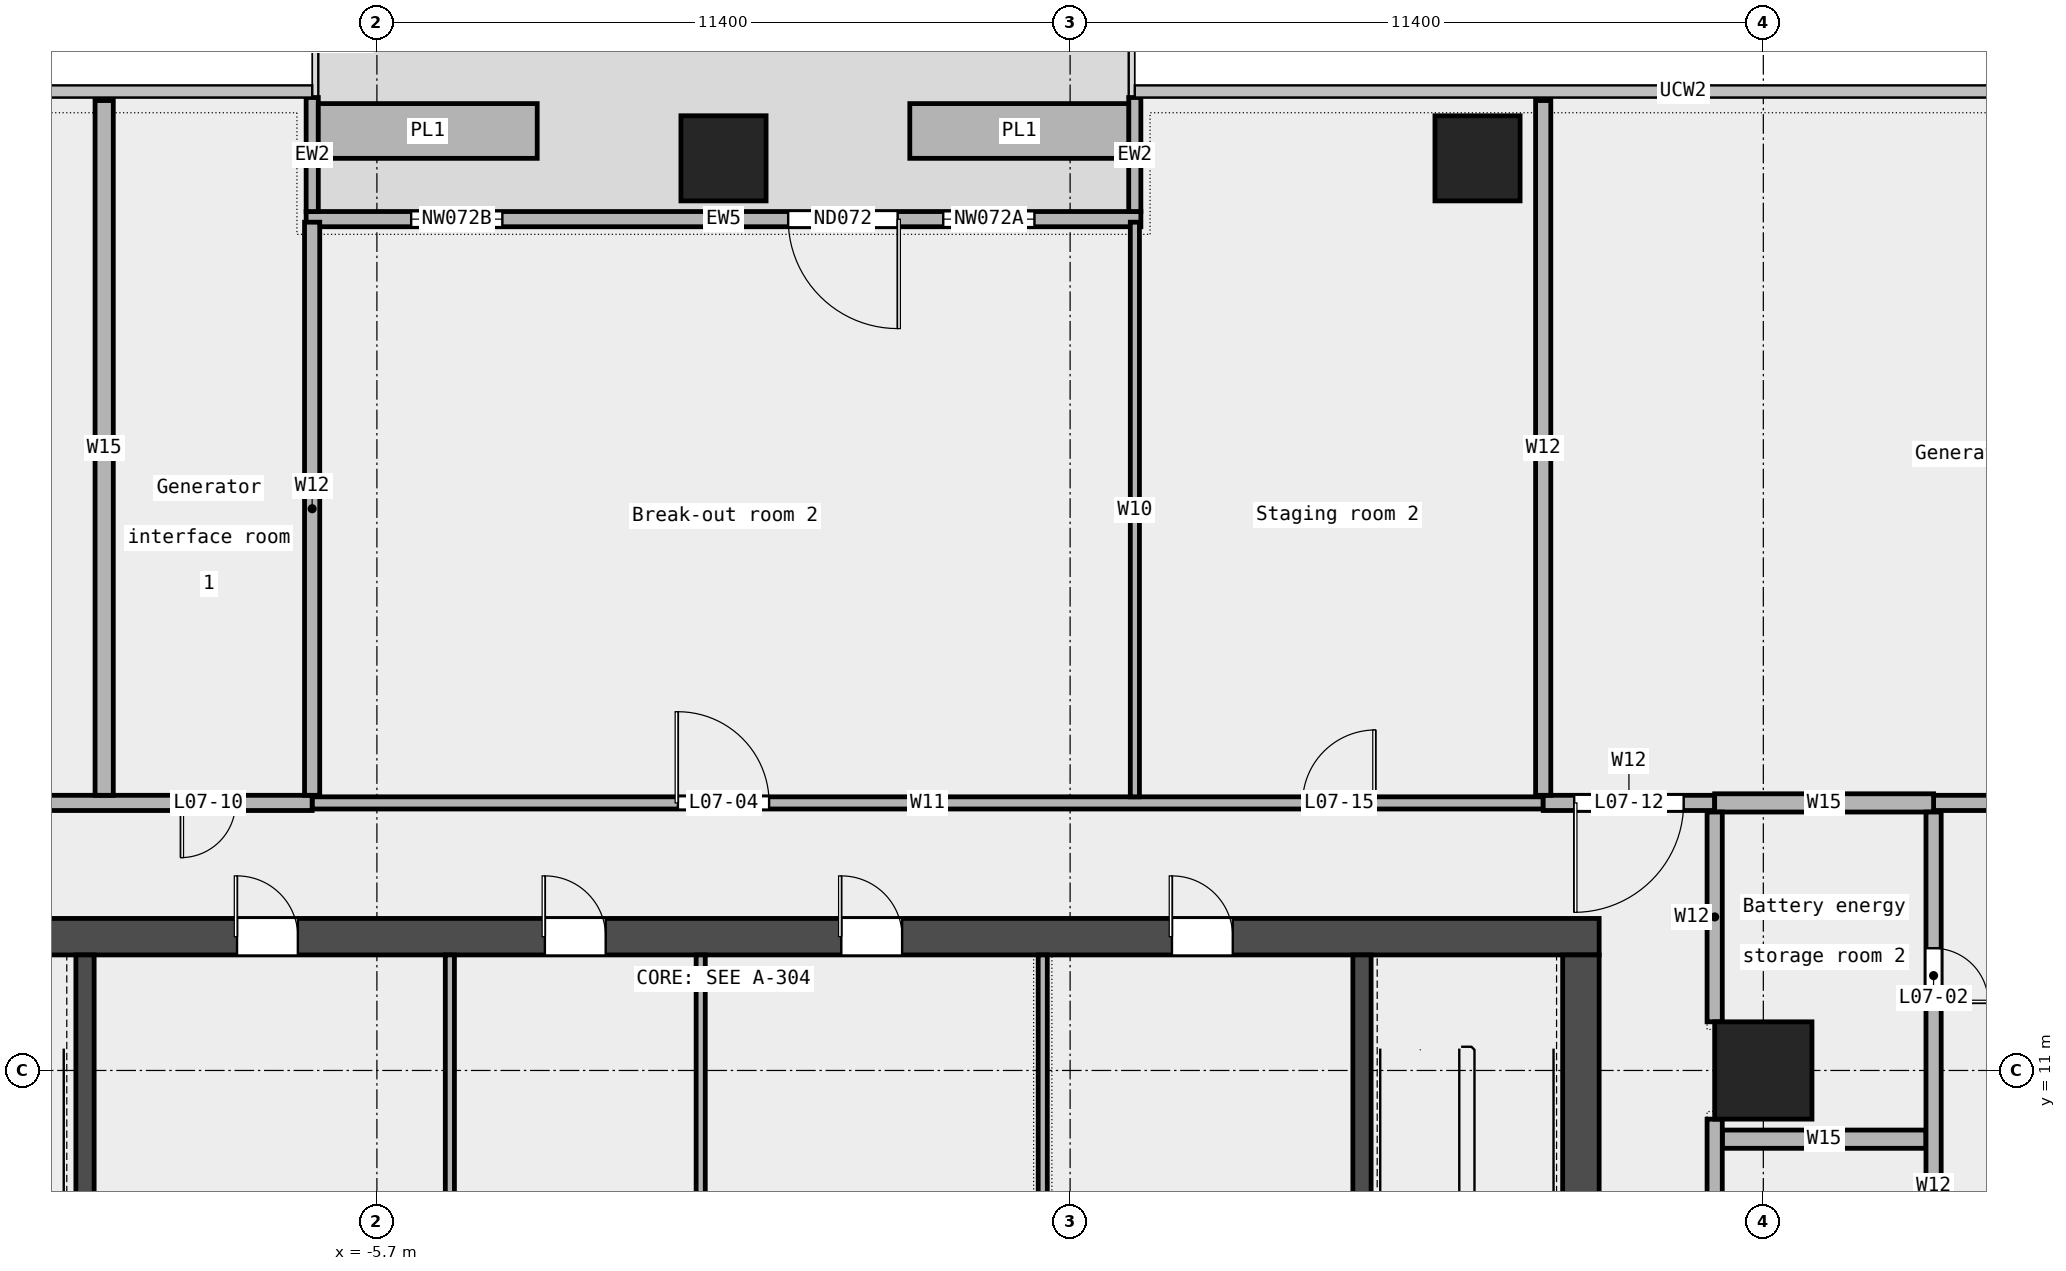
"""IFC4 building model, lengths in metres.
Left out: names, types, materials, properties, quantities, classifications, styles, units other than length and angle.
Written with IfcOpenShell. Run it as: python <this file> out.ifc"""

import sys

from ifc_helpers import new_model, si_unit, direction, frame, frame_2d, origin, origin_2d, place, context, subcontext, project, spatial, rectangle, extrude, element, fill, save


model = new_model("IFC4")
c1 = context("Model", 3, precision=1e-05, world=origin(), true_north=direction((0.0, 1.0)))
c2 = subcontext(c1, "Body", "Model", "MODEL_VIEW")
j1 = project(units=[si_unit("LENGTHUNIT", "METRE"), si_unit("PLANEANGLEUNIT", "RADIAN")], contexts=[c1])
p1 = place(None, origin())
s1 = spatial("IfcSite", under=j1, at=p1, CompositionType="ELEMENT")
p2 = place(p1, origin())
s2 = spatial("IfcBuilding", under=s1, at=p2, CompositionType="ELEMENT")
p3 = place(p2, frame((0.0, 0.0, 40.6)))
s3 = spatial("IfcBuildingStorey", under=s2, at=p3, CompositionType="ELEMENT", Elevation=40.6)
for number, where, z_axis, x_axis in (
    (1, (12.4, 26.0, 0.0), (0.0, 0.0, 1.0), (1.0, 0.0, 0.0)),
    (2, (0.0, 26.0, 0.0), (0.0, 0.0, 1.0), (1.0, 0.0, 0.0)),
):
    element("IfcColumn", number, at=place(p3, frame(where, z_axis=z_axis, x_axis=x_axis)), inside=s3, PredefinedType="COLUMN", context=c2, shape_type="SweptSolid", body=[
        extrude(rectangle(XDim=1.4, YDim=1.4, at=origin_2d()), origin(), (0.0, 0.0, 1.0), 4.35),
    ])
p4 = place(p3, frame((17.1, 11.0, 0.0), z_axis=(0.0, 0.0, 1.0), x_axis=(1.0, 0.0, 0.0)))
e3 = element("IfcColumn", 3, at=p4, inside=s3, PredefinedType="COLUMN", context=c2, shape_type="SweptSolid", body=[
    extrude(rectangle(XDim=1.6, YDim=1.6, at=origin_2d()), origin(), (0.0, 0.0, 1.0), 4.35),
])
p5 = place(p3, frame((6.864, 25.0, 0.0), z_axis=(0.0, 0.0, 1.0), x_axis=(-1.0, 0.0, 0.0)))
e4 = element("IfcWall", 4, at=p5, inside=s3, PredefinedType="STANDARD", context=c2, shape_type="SweptSolid", body=[
    extrude(rectangle(XDim=13.727, YDim=0.25, at=frame_2d((6.864, 0.0))), origin(), (0.0, 0.0, 1.0), 4.35),
])
p6 = place(p5, frame((1.75, 0.0, 0.45)))
e5 = element("IfcOpeningElement", 5, at=p6, cuts=e4, PredefinedType="OPENING", context=c2, shape_type="SweptSolid", body=[
    extrude(rectangle(XDim=1.5, YDim=3.0, at=frame_2d((0.75, 1.5))), frame((0.0, 0.137, 0.0), z_axis=(0.0, -1.0, 0.0), x_axis=(1.0, 0.0, 0.0)), (0.0, 0.0, 1.0), 0.274),
])
p7 = place(p5, frame((4.0, 0.0, 0.0)))
e6 = element("IfcOpeningElement", 6, at=p7, cuts=e4, PredefinedType="OPENING", context=c2, shape_type="SweptSolid", body=[
    extrude(rectangle(XDim=1.8, YDim=2.4, at=frame_2d((0.9, 1.2))), frame((0.0, 0.137, 0.0), z_axis=(0.0, -1.0, 0.0), x_axis=(1.0, 0.0, 0.0)), (0.0, 0.0, 1.0), 0.274),
])
p8 = place(p5, frame((10.5, 0.0, 0.45)))
e7 = element("IfcOpeningElement", 7, at=p8, cuts=e4, PredefinedType="OPENING", context=c2, shape_type="SweptSolid", body=[
    extrude(rectangle(XDim=1.5, YDim=3.0, at=frame_2d((0.75, 1.5))), frame((0.0, 0.137, 0.0), z_axis=(0.0, -1.0, 0.0), x_axis=(1.0, 0.0, 0.0)), (0.0, 0.0, 1.0), 0.274),
])
for number, where, z_axis, x_axis in (
    (8, (6.764, 27.0, 0.0), (0.0, 0.0, 1.0), (0.0, -1.0, 0.0)),
    (9, (-6.764, 27.0, 0.0), (0.0, 0.0, 1.0), (0.0, -1.0, 0.0)),
):
    element("IfcWall", number, at=place(p3, frame(where, z_axis=z_axis, x_axis=x_axis)), inside=s3, PredefinedType="STANDARD", context=c2, shape_type="SweptSolid", body=[
        extrude(rectangle(XDim=1.875, YDim=0.2, at=frame_2d((0.938, 0.0))), origin(), (0.0, 0.0, 1.0), 4.35),
    ])
for number, where, z_axis, x_axis in (
    (10, (6.664, 26.45, 0.0), (0.0, 0.0, 1.0), (-1.0, 0.0, 0.0)),
    (11, (-3.064, 26.45, 0.0), (0.0, 0.0, 1.0), (-1.0, 0.0, 0.0)),
):
    element("IfcWall", number, at=place(p3, frame(where, z_axis=z_axis, x_axis=x_axis)), inside=s3, PredefinedType="STANDARD", context=c2, shape_type="SweptSolid", body=[
        extrude(rectangle(XDim=3.6, YDim=0.9, at=frame_2d((1.8, 0.0))), origin(), (0.0, 0.0, 1.0), 0.7),
    ])
p9 = place(p3, frame((16.425, 9.87, 0.0), z_axis=(0.0, 0.0, 1.0), x_axis=(1.0, 0.0, 0.0)))
e12 = element("IfcWall", 12, at=p9, inside=s3, PredefinedType="PARTITIONING", context=c2, shape_type="SweptSolid", body=[
    extrude(rectangle(XDim=3.35, YDim=0.3, at=frame_2d((1.675, 0.0))), origin(), (0.0, 0.0, 1.0), 4.35),
])
p10 = place(p3, frame((-6.765, 15.4, 0.0), z_axis=(0.0, 0.0, 1.0), x_axis=(1.0, 0.0, 0.0)))
e13 = element("IfcWall", 13, at=p10, inside=s3, PredefinedType="PARTITIONING", context=c2, shape_type="SweptSolid", body=[
    extrude(rectangle(XDim=20.245, YDim=0.2, at=frame_2d((10.123, 0.0))), origin(), (0.0, 0.0, 1.0), 4.35),
])
p11 = place(p10, frame((6.015, 0.0, 0.0)))
e14 = element("IfcOpeningElement", 14, at=p11, cuts=e13, PredefinedType="OPENING", context=c2, shape_type="SweptSolid", body=[
    extrude(rectangle(XDim=1.5, YDim=2.1, at=frame_2d((0.75, 1.05))), frame((0.0, 0.112, 0.0), z_axis=(0.0, -1.0, 0.0), x_axis=(1.0, 0.0, 0.0)), (0.0, 0.0, 1.0), 0.224),
])
p12 = place(p10, frame((16.288, 0.0, 0.0)))
e15 = element("IfcOpeningElement", 15, at=p12, cuts=e13, PredefinedType="OPENING", context=c2, shape_type="SweptSolid", body=[
    extrude(rectangle(XDim=1.2, YDim=2.1, at=frame_2d((0.6, 1.05))), frame((0.0, 0.112, 0.0), z_axis=(0.0, -1.0, 0.0), x_axis=(1.0, 0.0, 0.0)), (0.0, 0.0, 1.0), 0.224),
])
p13 = place(p3, frame((-21.7, 15.4, 0.0), z_axis=(0.0, 0.0, 1.0), x_axis=(1.0, 0.0, 0.0)))
e16 = element("IfcWall", 16, at=p13, inside=s3, PredefinedType="PARTITIONING", context=c2, shape_type="SweptSolid", body=[
    extrude(rectangle(XDim=14.935, YDim=0.25, at=frame_2d((7.468, 0.0))), origin(), (0.0, 0.0, 1.0), 4.35),
])
p14 = place(p13, frame((12.775, 0.0, 0.0)))
e17 = element("IfcOpeningElement", 17, at=p14, cuts=e16, PredefinedType="OPENING", context=c2, shape_type="SweptSolid", body=[
    extrude(rectangle(XDim=0.9, YDim=2.1, at=frame_2d((0.45, 1.05))), frame((0.0, 0.137, 0.0), z_axis=(0.0, -1.0, 0.0), x_axis=(1.0, 0.0, 0.0)), (0.0, 0.0, 1.0), 0.274),
])
p15 = place(p13, frame((7.558, 0.0, 0.0)))
e18 = element("IfcOpeningElement", 18, at=p15, cuts=e16, PredefinedType="OPENING", context=c2, shape_type="SweptSolid", body=[
    extrude(rectangle(XDim=1.8, YDim=2.1, at=frame_2d((0.9, 1.05))), frame((0.0, 0.137, 0.0), z_axis=(0.0, -1.0, 0.0), x_axis=(1.0, 0.0, 0.0)), (0.0, 0.0, 1.0), 0.274),
])
p16 = place(p3, frame((13.48, 15.4, 0.0), z_axis=(0.0, 0.0, 1.0), x_axis=(1.0, 0.0, 0.0)))
e19 = element("IfcWall", 19, at=p16, inside=s3, PredefinedType="PARTITIONING", context=c2, shape_type="SweptSolid", body=[
    extrude(rectangle(XDim=2.82, YDim=0.25, at=frame_2d((1.41, 0.0))), origin(), (0.0, 0.0, 1.0), 4.35),
])
p17 = place(p16, frame((0.51, 0.0, 0.0)))
e20 = element("IfcOpeningElement", 20, at=p17, cuts=e19, PredefinedType="OPENING", context=c2, shape_type="SweptSolid", body=[
    extrude(rectangle(XDim=1.8, YDim=2.1, at=frame_2d((0.9, 1.05))), frame((0.0, 0.137, 0.0), z_axis=(0.0, -1.0, 0.0), x_axis=(1.0, 0.0, 0.0)), (0.0, 0.0, 1.0), 0.274),
])
p18 = place(p3, frame((19.9, 15.4, 0.0), z_axis=(0.0, 0.0, 1.0), x_axis=(1.0, 0.0, 0.0)))
e21 = element("IfcWall", 21, at=p18, inside=s3, PredefinedType="PARTITIONING", context=c2, shape_type="SweptSolid", body=[
    extrude(rectangle(XDim=10.85, YDim=0.25, at=frame_2d((5.425, 0.0))), origin(), (0.0, 0.0, 1.0), 4.35),
])
p19 = place(p3, frame((16.3, 15.4, 0.0), z_axis=(0.0, 0.0, 1.0), x_axis=(1.0, 0.0, 0.0)))
e22 = element("IfcWall", 22, at=p19, inside=s3, PredefinedType="PARTITIONING", context=c2, shape_type="SweptSolid", body=[
    extrude(rectangle(XDim=3.6, YDim=0.3, at=frame_2d((1.8, 0.0))), origin(), (0.0, 0.0, 1.0), 4.35),
])
p20 = place(p3, frame((-10.185, 15.525, 0.0), z_axis=(0.0, 0.0, 1.0), x_axis=(0.0, 1.0, 0.0)))
e23 = element("IfcWall", 23, at=p20, inside=s3, PredefinedType="PARTITIONING", context=c2, shape_type="SweptSolid", body=[
    extrude(rectangle(XDim=11.425, YDim=0.3, at=frame_2d((5.712, 0.0))), origin(), (0.0, 0.0, 1.0), 4.35),
])
p21 = place(p3, frame((-6.765, 15.525, 0.0), z_axis=(0.0, 0.0, 1.0), x_axis=(0.0, 1.0, 0.0)))
e24 = element("IfcWall", 24, at=p21, inside=s3, PredefinedType="PARTITIONING", context=c2, shape_type="SweptSolid", body=[
    extrude(rectangle(XDim=9.425, YDim=0.25, at=frame_2d((4.712, 0.0))), origin(), (0.0, 0.0, 1.0), 4.35),
])
p22 = place(p3, frame((6.765, 15.5, 0.0), z_axis=(0.0, 0.0, 1.0), x_axis=(0.0, 1.0, 0.0)))
e25 = element("IfcWall", 25, at=p22, inside=s3, PredefinedType="PARTITIONING", context=c2, shape_type="SweptSolid", body=[
    extrude(rectangle(XDim=9.45, YDim=0.15, at=frame_2d((4.725, 0.0))), origin(), (0.0, 0.0, 1.0), 4.35),
])
p23 = place(p3, frame((13.48, 15.525, 0.0), z_axis=(0.0, 0.0, 1.0), x_axis=(0.0, 1.0, 0.0)))
e26 = element("IfcWall", 26, at=p23, inside=s3, PredefinedType="PARTITIONING", context=c2, shape_type="SweptSolid", body=[
    extrude(rectangle(XDim=11.425, YDim=0.25, at=frame_2d((5.712, 0.0))), origin(), (0.0, 0.0, 1.0), 4.35),
])
p24 = place(p3, frame((16.3, 2.95, 0.0), z_axis=(0.0, 0.0, 1.0), x_axis=(0.0, 1.0, 0.0)))
e27 = element("IfcWall", 27, at=p24, inside=s3, PredefinedType="PARTITIONING", context=c2, shape_type="SweptSolid", body=[
    extrude(rectangle(XDim=7.25, YDim=0.25, at=frame_2d((3.625, 0.0))), origin(), (0.0, 0.0, 1.0), 4.35),
])
p25 = place(p3, frame((16.3, 11.8, 0.0), z_axis=(0.0, 0.0, 1.0), x_axis=(0.0, 1.0, 0.0)))
e28 = element("IfcWall", 28, at=p25, inside=s3, PredefinedType="PARTITIONING", context=c2, shape_type="SweptSolid", body=[
    extrude(rectangle(XDim=3.45, YDim=0.25, at=frame_2d((1.725, 0.0))), origin(), (0.0, 0.0, 1.0), 4.35),
])
p26 = place(p3, frame((19.9, 2.95, 0.0), z_axis=(0.0, 0.0, 1.0), x_axis=(0.0, 1.0, 0.0)))
e29 = element("IfcWall", 29, at=p26, inside=s3, PredefinedType="PARTITIONING", context=c2, shape_type="SweptSolid", body=[
    extrude(rectangle(XDim=12.3, YDim=0.25, at=frame_2d((6.15, 0.0))), origin(), (0.0, 0.0, 1.0), 4.35),
])
p27 = place(p26, frame((9.16, 0.0, 0.0)))
e30 = element("IfcOpeningElement", 30, at=p27, cuts=e29, PredefinedType="OPENING", context=c2, shape_type="SweptSolid", body=[
    extrude(rectangle(XDim=0.9, YDim=2.1, at=frame_2d((0.45, 1.05))), frame((0.0, 0.137, 0.0), z_axis=(0.0, -1.0, 0.0), x_axis=(1.0, 0.0, 0.0)), (0.0, 0.0, 1.0), 0.274),
])
p28 = place(p26, frame((3.01, 0.0, 0.0)))
e31 = element("IfcOpeningElement", 31, at=p28, cuts=e29, PredefinedType="OPENING", context=c2, shape_type="SweptSolid", body=[
    extrude(rectangle(XDim=0.9, YDim=2.1, at=frame_2d((0.45, 1.05))), frame((0.0, 0.137, 0.0), z_axis=(0.0, -1.0, 0.0), x_axis=(1.0, 0.0, 0.0)), (0.0, 0.0, 1.0), 0.274),
])
p29 = place(p3, frame((-14.4, 13.2, 0.0), z_axis=(0.0, 0.0, 1.0), x_axis=(1.0, 0.0, 0.0)))
e32 = element("IfcWall", 32, at=p29, inside=s3, PredefinedType="SHEAR", context=c2, shape_type="SweptSolid", body=[
    extrude(rectangle(XDim=28.8, YDim=0.6, at=frame_2d((14.4, 0.0))), origin(), (0.0, 0.0, 1.0), 4.5),
])
p30 = place(p29, frame((6.4, 0.0, 0.0)))
e33 = element("IfcOpeningElement", 33, at=p30, cuts=e32, PredefinedType="OPENING", context=c2, shape_type="SweptSolid", body=[
    extrude(rectangle(XDim=1.0, YDim=2.1, at=frame_2d((0.5, 1.05))), frame((0.0, 0.312, 0.0), z_axis=(0.0, -1.0, 0.0), x_axis=(1.0, 0.0, 0.0)), (0.0, 0.0, 1.0), 0.624),
])
p31 = place(p29, frame((11.462, 0.0, 0.0)))
e34 = element("IfcOpeningElement", 34, at=p31, cuts=e32, PredefinedType="OPENING", context=c2, shape_type="SweptSolid", body=[
    extrude(rectangle(XDim=1.0, YDim=2.1, at=frame_2d((0.5, 1.05))), frame((0.0, 0.312, 0.0), z_axis=(0.0, -1.0, 0.0), x_axis=(1.0, 0.0, 0.0)), (0.0, 0.0, 1.0), 0.624),
])
p32 = place(p29, frame((16.337, 0.0, 0.0)))
e35 = element("IfcOpeningElement", 35, at=p32, cuts=e32, PredefinedType="OPENING", context=c2, shape_type="SweptSolid", body=[
    extrude(rectangle(XDim=1.0, YDim=2.1, at=frame_2d((0.5, 1.05))), frame((0.0, 0.312, 0.0), z_axis=(0.0, -1.0, 0.0), x_axis=(1.0, 0.0, 0.0)), (0.0, 0.0, 1.0), 0.624),
])
p33 = place(p29, frame((21.775, 0.0, 0.0)))
e36 = element("IfcOpeningElement", 36, at=p33, cuts=e32, PredefinedType="OPENING", context=c2, shape_type="SweptSolid", body=[
    extrude(rectangle(XDim=1.0, YDim=2.1, at=frame_2d((0.5, 1.05))), frame((0.0, 0.312, 0.0), z_axis=(0.0, -1.0, 0.0), x_axis=(1.0, 0.0, 0.0)), (0.0, 0.0, 1.0), 0.624),
])
p34 = place(p3, frame((14.1, -6.6, 0.0), z_axis=(0.0, 0.0, 1.0), x_axis=(0.0, 1.0, 0.0)))
e37 = element("IfcWall", 37, at=p34, inside=s3, PredefinedType="SHEAR", context=c2, shape_type="SweptSolid", body=[
    extrude(rectangle(XDim=19.5, YDim=0.6, at=frame_2d((9.75, 0.0))), origin(), (0.0, 0.0, 1.0), 4.5),
])
p35 = place(p34, frame((9.3, 0.0, 0.0)))
e38 = element("IfcOpeningElement", 38, at=p35, cuts=e37, PredefinedType="OPENING", context=c2, shape_type="SweptSolid", body=[
    extrude(rectangle(XDim=1.8, YDim=2.1, at=frame_2d((0.9, 1.05))), frame((0.0, 0.312, 0.0), z_axis=(0.0, -1.0, 0.0), x_axis=(1.0, 0.0, 0.0)), (0.0, 0.0, 1.0), 0.624),
])
for number, where, z_axis, x_axis in (
    (39, (-10.5, 5.25, 0.0), (0.0, 0.0, 1.0), (0.0, 1.0, 0.0)),
    (40, (10.5, 5.25, 0.0), (0.0, 0.0, 1.0), (0.0, 1.0, 0.0)),
):
    element("IfcWall", number, at=place(p3, frame(where, z_axis=z_axis, x_axis=x_axis)), inside=s3, PredefinedType="SHEAR", context=c2, shape_type="SweptSolid", body=[
        extrude(rectangle(XDim=7.65, YDim=0.3, at=frame_2d((3.825, 0.0))), origin(), (0.0, 0.0, 1.0), 4.5),
    ])
for number, where, z_axis, x_axis in (
    (41, (-4.5, 8.55, 0.0), (0.0, 0.0, 1.0), (0.0, 1.0, 0.0)),
    (42, (-0.375, 8.55, 0.0), (0.0, 0.0, 1.0), (0.0, 1.0, 0.0)),
    (43, (5.25, 8.55, 0.0), (0.0, 0.0, 1.0), (0.0, 1.0, 0.0)),
):
    element("IfcWall", number, at=place(p3, frame(where, z_axis=z_axis, x_axis=x_axis)), inside=s3, PredefinedType="PARTITIONING", context=c2, shape_type="SweptSolid", body=[
        extrude(rectangle(XDim=4.35, YDim=0.15, at=frame_2d((2.175, 0.0))), origin(), (0.0, 0.0, 1.0), 4.5),
    ])
p36 = place(p6, origin())
e44 = element("IfcWindow", 44, at=p36, inside=s3, PartitioningType="SINGLE_PANEL", PredefinedType="WINDOW", context=c2, shape_type="SweptSolid", body=[
    extrude(rectangle(XDim=1.5, YDim=3.0, at=frame_2d((0.75, 1.5))), frame((0.0, 0.03, 0.0), z_axis=(0.0, -1.0, 0.0), x_axis=(1.0, 0.0, 0.0)), (0.0, 0.0, 1.0), 0.06),
])
fill(e5, e44)
p37 = place(p7, origin())
e45 = element("IfcDoor", 45, at=p37, inside=s3, OperationType="DOUBLE_DOOR_SINGLE_SWING", PredefinedType="DOOR", context=c2, shape_type="SweptSolid", body=[
    extrude(rectangle(XDim=1.8, YDim=2.4, at=frame_2d((0.9, 1.2))), frame((0.0, 0.025, 0.0), z_axis=(0.0, -1.0, 0.0), x_axis=(1.0, 0.0, 0.0)), (0.0, 0.0, 1.0), 0.05),
])
fill(e6, e45)
p38 = place(p8, origin())
e46 = element("IfcWindow", 46, at=p38, inside=s3, PartitioningType="SINGLE_PANEL", PredefinedType="WINDOW", context=c2, shape_type="SweptSolid", body=[
    extrude(rectangle(XDim=1.5, YDim=3.0, at=frame_2d((0.75, 1.5))), frame((0.0, 0.03, 0.0), z_axis=(0.0, -1.0, 0.0), x_axis=(1.0, 0.0, 0.0)), (0.0, 0.0, 1.0), 0.06),
])
fill(e7, e46)
p39 = place(p27, origin())
e47 = element("IfcDoor", 47, at=p39, inside=s3, OperationType="SINGLE_SWING_RIGHT", PredefinedType="DOOR", context=c2, shape_type="SweptSolid", body=[
    extrude(rectangle(XDim=0.9, YDim=2.1, at=frame_2d((0.45, 1.05))), frame((0.0, 0.025, 0.0), z_axis=(0.0, -1.0, 0.0), x_axis=(1.0, 0.0, 0.0)), (0.0, 0.0, 1.0), 0.05),
])
fill(e30, e47)
p40 = place(p11, origin())
e48 = element("IfcDoor", 48, at=p40, inside=s3, OperationType="DOUBLE_DOOR_SINGLE_SWING", PredefinedType="DOOR", context=c2, shape_type="SweptSolid", body=[
    extrude(rectangle(XDim=1.5, YDim=2.1, at=frame_2d((0.75, 1.05))), frame((0.0, 0.025, 0.0), z_axis=(0.0, -1.0, 0.0), x_axis=(1.0, 0.0, 0.0)), (0.0, 0.0, 1.0), 0.05),
])
fill(e14, e48)
p41 = place(p14, origin())
e49 = element("IfcDoor", 49, at=p41, inside=s3, OperationType="SINGLE_SWING_RIGHT", PredefinedType="DOOR", context=c2, shape_type="SweptSolid", body=[
    extrude(rectangle(XDim=0.9, YDim=2.1, at=frame_2d((0.45, 1.05))), frame((0.0, 0.025, 0.0), z_axis=(0.0, -1.0, 0.0), x_axis=(1.0, 0.0, 0.0)), (0.0, 0.0, 1.0), 0.05),
])
fill(e17, e49)
p42 = place(p17, origin())
e50 = element("IfcDoor", 50, at=p42, inside=s3, OperationType="DOUBLE_DOOR_SINGLE_SWING", PredefinedType="DOOR", context=c2, shape_type="SweptSolid", body=[
    extrude(rectangle(XDim=1.8, YDim=2.1, at=frame_2d((0.9, 1.05))), frame((0.0, 0.025, 0.0), z_axis=(0.0, -1.0, 0.0), x_axis=(1.0, 0.0, 0.0)), (0.0, 0.0, 1.0), 0.05),
])
fill(e20, e50)
p43 = place(p12, origin())
e51 = element("IfcDoor", 51, at=p43, inside=s3, OperationType="SINGLE_SWING_RIGHT", PredefinedType="DOOR", context=c2, shape_type="SweptSolid", body=[
    extrude(rectangle(XDim=1.2, YDim=2.1, at=frame_2d((0.6, 1.05))), frame((0.0, 0.025, 0.0), z_axis=(0.0, -1.0, 0.0), x_axis=(1.0, 0.0, 0.0)), (0.0, 0.0, 1.0), 0.05),
])
fill(e15, e51)
p44 = place(p30, origin())
e52 = element("IfcDoor", 52, at=p44, inside=s3, OperationType="SINGLE_SWING_LEFT", PredefinedType="DOOR", context=c2, shape_type="SweptSolid", body=[
    extrude(rectangle(XDim=1.0, YDim=2.1, at=frame_2d((0.5, 1.05))), frame((0.0, 0.025, 0.0), z_axis=(0.0, -1.0, 0.0), x_axis=(1.0, 0.0, 0.0)), (0.0, 0.0, 1.0), 0.05),
])
fill(e33, e52)
p45 = place(p31, origin())
e53 = element("IfcDoor", 53, at=p45, inside=s3, OperationType="SINGLE_SWING_LEFT", PredefinedType="DOOR", context=c2, shape_type="SweptSolid", body=[
    extrude(rectangle(XDim=1.0, YDim=2.1, at=frame_2d((0.5, 1.05))), frame((0.0, 0.025, 0.0), z_axis=(0.0, -1.0, 0.0), x_axis=(1.0, 0.0, 0.0)), (0.0, 0.0, 1.0), 0.05),
])
fill(e34, e53)
p46 = place(p32, origin())
e54 = element("IfcDoor", 54, at=p46, inside=s3, OperationType="SINGLE_SWING_LEFT", PredefinedType="DOOR", context=c2, shape_type="SweptSolid", body=[
    extrude(rectangle(XDim=1.0, YDim=2.1, at=frame_2d((0.5, 1.05))), frame((0.0, 0.025, 0.0), z_axis=(0.0, -1.0, 0.0), x_axis=(1.0, 0.0, 0.0)), (0.0, 0.0, 1.0), 0.05),
])
fill(e35, e54)
p47 = place(p33, origin())
e55 = element("IfcDoor", 55, at=p47, inside=s3, OperationType="SINGLE_SWING_LEFT", PredefinedType="DOOR", context=c2, shape_type="SweptSolid", body=[
    extrude(rectangle(XDim=1.0, YDim=2.1, at=frame_2d((0.5, 1.05))), frame((0.0, 0.025, 0.0), z_axis=(0.0, -1.0, 0.0), x_axis=(1.0, 0.0, 0.0)), (0.0, 0.0, 1.0), 0.05),
])
fill(e36, e55)
save(model, sys.argv[1])
